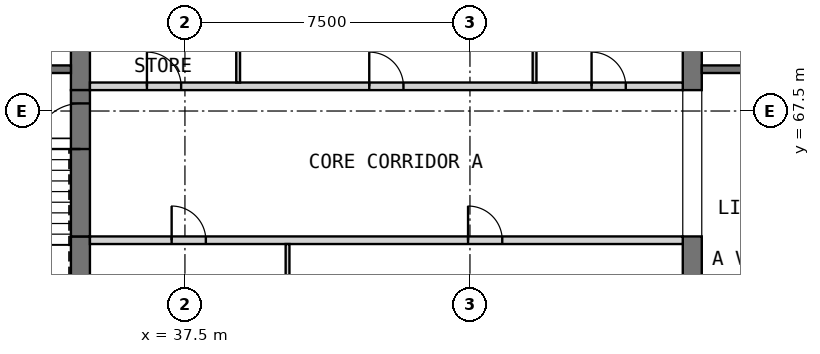
"""IFC4 building model, lengths in metres.
Left out: names, types, materials, properties, quantities, classifications, styles, units other than length and angle.
Written with IfcOpenShell. Run it as: python <this file> out.ifc"""

import sys

from ifc_helpers import new_model, si_unit, direction, frame, frame_2d, origin, place, context, subcontext, project, spatial, rectangle, extrude, element, fill, save


model = new_model("IFC4")
c1 = context("Model", 3, precision=1e-05, world=origin(), true_north=direction((0.0, 1.0)))
c2 = subcontext(c1, "Body", "Model", "MODEL_VIEW")
j1 = project(units=[si_unit("LENGTHUNIT", "METRE"), si_unit("PLANEANGLEUNIT", "RADIAN")], contexts=[c1])
p1 = place(None, origin())
s1 = spatial("IfcSite", under=j1, at=p1, CompositionType="ELEMENT")
p2 = place(p1, origin())
s2 = spatial("IfcBuilding", under=s1, at=p2, CompositionType="ELEMENT")
p3 = place(p2, frame((0.0, 0.0, 280.2)))
s3 = spatial("IfcBuildingStorey", under=s2, at=p3, CompositionType="ELEMENT", Elevation=280.2)
p4 = place(p3, frame((34.75, 60.6, 0.0), z_axis=(0.0, 0.0, 1.0), x_axis=(0.0, 1.0, 0.0)))
e1 = element("IfcWall", 1, at=p4, inside=s3, PredefinedType="SHEAR", context=c2, shape_type="SweptSolid", body=[
    extrude(rectangle(XDim=3.6, YDim=0.5, at=frame_2d((1.8, 0.0))), origin(), (0.0, 0.0, 1.0), 3.5),
])
p5 = place(p3, frame((34.75, 68.05, 0.0), z_axis=(0.0, 0.0, 1.0), x_axis=(0.0, 1.0, 0.0)))
e2 = element("IfcWall", 2, at=p5, inside=s3, PredefinedType="SHEAR", context=c2, shape_type="SweptSolid", body=[
    extrude(rectangle(XDim=6.4, YDim=0.5, at=frame_2d((3.2, 0.0))), origin(), (0.0, 0.0, 1.0), 3.5),
])
p6 = place(p3, frame((50.85, 60.6, 0.0), z_axis=(0.0, 0.0, 1.0), x_axis=(0.0, 1.0, 0.0)))
e3 = element("IfcWall", 3, at=p6, inside=s3, PredefinedType="SHEAR", context=c2, shape_type="SweptSolid", body=[
    extrude(rectangle(XDim=3.6, YDim=0.5, at=frame_2d((1.8, 0.0))), origin(), (0.0, 0.0, 1.0), 3.5),
])
p7 = place(p3, frame((50.85, 68.05, 0.0), z_axis=(0.0, 0.0, 1.0), x_axis=(0.0, 1.0, 0.0)))
e4 = element("IfcWall", 4, at=p7, inside=s3, PredefinedType="SHEAR", context=c2, shape_type="SweptSolid", body=[
    extrude(rectangle(XDim=6.4, YDim=0.5, at=frame_2d((3.2, 0.0))), origin(), (0.0, 0.0, 1.0), 3.5),
])
p8 = place(p3, frame((35.0, 64.1, 0.0), z_axis=(0.0, 0.0, 1.0), x_axis=(1.0, 0.0, 0.0)))
e5 = element("IfcWall", 5, at=p8, inside=s3, PredefinedType="PARTITIONING", context=c2, shape_type="SweptSolid", body=[
    extrude(rectangle(XDim=15.6, YDim=0.2, at=frame_2d((7.8, 0.0))), origin(), (0.0, 0.0, 1.0), 3.25),
])
p9 = place(p8, frame((2.15, 0.0, 0.0)))
e6 = element("IfcOpeningElement", 6, at=p9, cuts=e5, PredefinedType="OPENING", context=c2, shape_type="SweptSolid", body=[
    extrude(rectangle(XDim=0.9, YDim=2.1, at=frame_2d((0.45, 1.05))), frame((0.0, 0.11, 0.0), z_axis=(0.0, -1.0, 0.0), x_axis=(1.0, 0.0, 0.0)), (0.0, 0.0, 1.0), 0.22),
])
p10 = place(p8, frame((9.95, 0.0, 0.0)))
e7 = element("IfcOpeningElement", 7, at=p10, cuts=e5, PredefinedType="OPENING", context=c2, shape_type="SweptSolid", body=[
    extrude(rectangle(XDim=0.9, YDim=2.1, at=frame_2d((0.45, 1.05))), frame((0.0, 0.11, 0.0), z_axis=(0.0, -1.0, 0.0), x_axis=(1.0, 0.0, 0.0)), (0.0, 0.0, 1.0), 0.22),
])
p11 = place(p3, frame((40.2, 60.6, 0.0), z_axis=(0.0, 0.0, 1.0), x_axis=(0.0, 1.0, 0.0)))
e8 = element("IfcWall", 8, at=p11, inside=s3, PredefinedType="PARTITIONING", context=c2, shape_type="SweptSolid", body=[
    extrude(rectangle(XDim=3.4, YDim=0.1, at=frame_2d((1.7, 0.0))), origin(), (0.0, 0.0, 1.0), 3.25),
])
p12 = place(p3, frame((35.0, 68.15, 0.0), z_axis=(0.0, 0.0, 1.0), x_axis=(1.0, 0.0, 0.0)))
e9 = element("IfcWall", 9, at=p12, inside=s3, PredefinedType="PARTITIONING", context=c2, shape_type="SweptSolid", body=[
    extrude(rectangle(XDim=15.6, YDim=0.2, at=frame_2d((7.8, 0.0))), origin(), (0.0, 0.0, 1.0), 3.25),
])
p13 = place(p12, frame((1.5, 0.0, 0.0)))
e10 = element("IfcOpeningElement", 10, at=p13, cuts=e9, PredefinedType="OPENING", context=c2, shape_type="SweptSolid", body=[
    extrude(rectangle(XDim=0.9, YDim=2.1, at=frame_2d((0.45, 1.05))), frame((0.0, 0.11, 0.0), z_axis=(0.0, -1.0, 0.0), x_axis=(1.0, 0.0, 0.0)), (0.0, 0.0, 1.0), 0.22),
])
p14 = place(p12, frame((7.35, 0.0, 0.0)))
e11 = element("IfcOpeningElement", 11, at=p14, cuts=e9, PredefinedType="OPENING", context=c2, shape_type="SweptSolid", body=[
    extrude(rectangle(XDim=0.9, YDim=2.1, at=frame_2d((0.45, 1.05))), frame((0.0, 0.11, 0.0), z_axis=(0.0, -1.0, 0.0), x_axis=(1.0, 0.0, 0.0)), (0.0, 0.0, 1.0), 0.22),
])
p15 = place(p12, frame((13.2, 0.0, 0.0)))
e12 = element("IfcOpeningElement", 12, at=p15, cuts=e9, PredefinedType="OPENING", context=c2, shape_type="SweptSolid", body=[
    extrude(rectangle(XDim=0.9, YDim=2.1, at=frame_2d((0.45, 1.05))), frame((0.0, 0.11, 0.0), z_axis=(0.0, -1.0, 0.0), x_axis=(1.0, 0.0, 0.0)), (0.0, 0.0, 1.0), 0.22),
])
for number, where, z_axis, x_axis in (
    (13, (38.9, 68.25, 0.0), (0.0, 0.0, 1.0), (0.0, 1.0, 0.0)),
    (14, (46.7, 68.25, 0.0), (0.0, 0.0, 1.0), (0.0, 1.0, 0.0)),
):
    element("IfcWall", number, at=place(p3, frame(where, z_axis=z_axis, x_axis=x_axis)), inside=s3, PredefinedType="PARTITIONING", context=c2, shape_type="SweptSolid", body=[
        extrude(rectangle(XDim=2.75, YDim=0.1, at=frame_2d((1.375, 0.0))), origin(), (0.0, 0.0, 1.0), 3.25),
    ])
p16 = place(p3, frame((34.75, 64.2, 0.0), z_axis=(0.0, 0.0, 1.0), x_axis=(0.0, 1.0, 0.0)))
e15 = element("IfcWall", 15, at=p16, inside=s3, PredefinedType="SOLIDWALL", context=c2, shape_type="SweptSolid", body=[
    extrude(rectangle(XDim=3.85, YDim=0.5, at=frame_2d((1.925, 0.0))), origin(), (0.0, 0.0, 1.0), 2.3),
])
p17 = place(p16, frame((2.3, 0.0, 0.0)))
e16 = element("IfcOpeningElement", 16, at=p17, cuts=e15, PredefinedType="OPENING", context=c2, shape_type="SweptSolid", body=[
    extrude(rectangle(XDim=1.2, YDim=2.1, at=frame_2d((0.6, 1.05))), frame((0.0, 0.26, 0.0), z_axis=(0.0, -1.0, 0.0), x_axis=(1.0, 0.0, 0.0)), (0.0, 0.0, 1.0), 0.52),
])
p18 = place(p3, frame((30.6, 68.6, 0.0), z_axis=(0.0, 0.0, 1.0), x_axis=(1.0, 0.0, 0.0)))
e17 = element("IfcWall", 17, at=p18, inside=s3, PredefinedType="SOLIDWALL", context=c2, shape_type="SweptSolid", body=[
    extrude(rectangle(XDim=3.9, YDim=0.2, at=frame_2d((1.95, 0.0))), origin(), (0.0, 0.0, 1.0), 3.25),
])
p19 = place(p18, frame((1.7, 0.0, 0.0)))
e18 = element("IfcOpeningElement", 18, at=p19, cuts=e17, PredefinedType="OPENING", context=c2, shape_type="SweptSolid", body=[
    extrude(rectangle(XDim=0.9, YDim=2.1, at=frame_2d((0.45, 1.05))), frame((0.0, 0.11, 0.0), z_axis=(0.0, -1.0, 0.0), x_axis=(1.0, 0.0, 0.0)), (0.0, 0.0, 1.0), 0.22),
])
p20 = place(p3, frame((51.1, 68.6, 0.0), z_axis=(0.0, 0.0, 1.0), x_axis=(1.0, 0.0, 0.0)))
e19 = element("IfcWall", 19, at=p20, inside=s3, PredefinedType="SOLIDWALL", context=c2, shape_type="SweptSolid", body=[
    extrude(rectangle(XDim=8.3, YDim=0.2, at=frame_2d((4.15, 0.0))), origin(), (0.0, 0.0, 1.0), 3.25),
])
p21 = place(p9, origin())
e20 = element("IfcDoor", 20, at=p21, inside=s3, OperationType="SINGLE_SWING_RIGHT", PredefinedType="DOOR", context=c2, shape_type="SweptSolid", body=[
    extrude(rectangle(XDim=0.9, YDim=2.1, at=frame_2d((0.45, 1.05))), frame((0.0, 0.025, 0.0), z_axis=(0.0, -1.0, 0.0), x_axis=(1.0, 0.0, 0.0)), (0.0, 0.0, 1.0), 0.05),
])
fill(e6, e20)
p22 = place(p10, origin())
e21 = element("IfcDoor", 21, at=p22, inside=s3, OperationType="SINGLE_SWING_LEFT", PredefinedType="DOOR", context=c2, shape_type="SweptSolid", body=[
    extrude(rectangle(XDim=0.9, YDim=2.1, at=frame_2d((0.45, 1.05))), frame((0.0, 0.025, 0.0), z_axis=(0.0, -1.0, 0.0), x_axis=(1.0, 0.0, 0.0)), (0.0, 0.0, 1.0), 0.05),
])
fill(e7, e21)
p23 = place(p13, origin())
e22 = element("IfcDoor", 22, at=p23, inside=s3, OperationType="SINGLE_SWING_RIGHT", PredefinedType="DOOR", context=c2, shape_type="SweptSolid", body=[
    extrude(rectangle(XDim=0.9, YDim=2.1, at=frame_2d((0.45, 1.05))), frame((0.0, 0.025, 0.0), z_axis=(0.0, -1.0, 0.0), x_axis=(1.0, 0.0, 0.0)), (0.0, 0.0, 1.0), 0.05),
])
fill(e10, e22)
p24 = place(p14, origin())
e23 = element("IfcDoor", 23, at=p24, inside=s3, OperationType="SINGLE_SWING_LEFT", PredefinedType="DOOR", context=c2, shape_type="SweptSolid", body=[
    extrude(rectangle(XDim=0.9, YDim=2.1, at=frame_2d((0.45, 1.05))), frame((0.0, 0.025, 0.0), z_axis=(0.0, -1.0, 0.0), x_axis=(1.0, 0.0, 0.0)), (0.0, 0.0, 1.0), 0.05),
])
fill(e11, e23)
p25 = place(p15, origin())
e24 = element("IfcDoor", 24, at=p25, inside=s3, OperationType="SINGLE_SWING_RIGHT", PredefinedType="DOOR", context=c2, shape_type="SweptSolid", body=[
    extrude(rectangle(XDim=0.9, YDim=2.1, at=frame_2d((0.45, 1.05))), frame((0.0, 0.025, 0.0), z_axis=(0.0, -1.0, 0.0), x_axis=(1.0, 0.0, 0.0)), (0.0, 0.0, 1.0), 0.05),
])
fill(e12, e24)
p26 = place(p17, origin())
e25 = element("IfcDoor", 25, at=p26, inside=s3, OperationType="SINGLE_SWING_LEFT", PredefinedType="DOOR", context=c2, shape_type="SweptSolid", body=[
    extrude(rectangle(XDim=1.2, YDim=2.1, at=frame_2d((0.6, 1.05))), frame((0.0, 0.025, 0.0), z_axis=(0.0, -1.0, 0.0), x_axis=(1.0, 0.0, 0.0)), (0.0, 0.0, 1.0), 0.05),
])
fill(e16, e25)
save(model, sys.argv[1])
